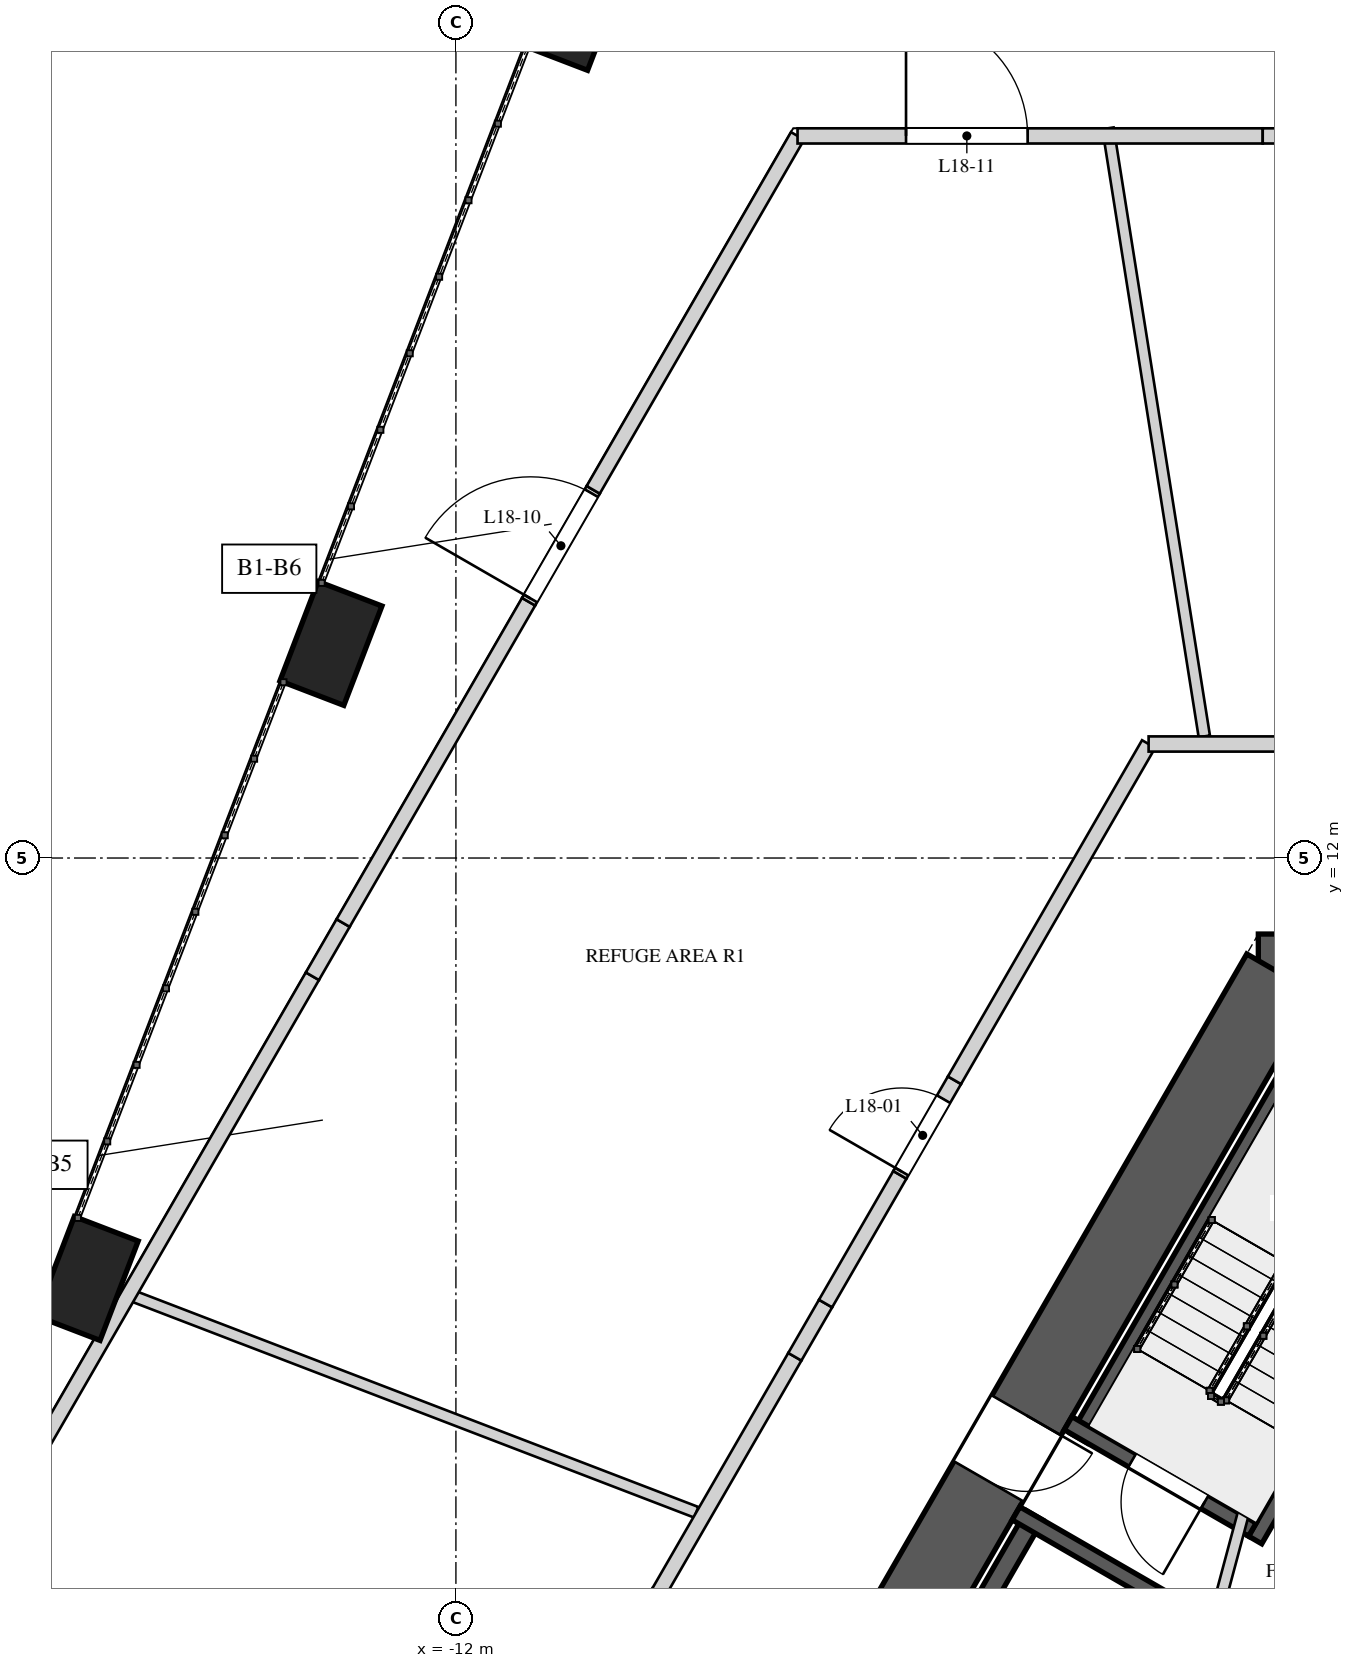
"""IFC4 building model, lengths in metres.
Left out: names, types, materials, properties, quantities, classifications, styles, units other than length and angle.
Written with IfcOpenShell. Run it as: python <this file> out.ifc"""

import sys

from ifc_helpers import new_model, si_unit, direction, frame, frame_2d, origin, origin_2d, place, context, subcontext, project, spatial, polyline, rectangle, outline, extrude, element, fill, save


model = new_model("IFC4")
c1 = context("Model", 3, precision=1e-05, world=origin(), true_north=direction((0.0, 1.0)))
c2 = subcontext(c1, "Body", "Model", "MODEL_VIEW")
j1 = project(units=[si_unit("LENGTHUNIT", "METRE"), si_unit("PLANEANGLEUNIT", "RADIAN")], contexts=[c1])
p1 = place(None, origin())
s1 = spatial("IfcSite", under=j1, at=p1, CompositionType="ELEMENT")
p2 = place(p1, origin())
s2 = spatial("IfcBuilding", under=s1, at=p2, CompositionType="ELEMENT")
p3 = place(p2, frame((0.0, 0.0, 83.2)))
s3 = spatial("IfcBuildingStorey", under=s2, at=p3, CompositionType="ELEMENT", Elevation=83.2)
p4 = place(p3, frame((1.443, 10.475, 0.0), z_axis=(0.0, 0.0, 1.0), x_axis=(-1.0, 0.0, 0.0)))
e1 = element("IfcWall", 1, at=p4, inside=s3, PredefinedType="SHEAR", context=c2, shape_type="SweptSolid", body=[
    extrude(rectangle(XDim=2.887, YDim=1.05, at=frame_2d((1.443, 0.0))), origin(), (0.0, 0.0, 1.0), 5.2),
])
p5 = place(p3, frame((-1.14, 10.475, 0.0), z_axis=(0.0, 0.0, 1.0), x_axis=(-0.499985955615, -0.866033512162, 0.0)))
e2 = element("IfcWall", 2, at=p5, inside=s3, PredefinedType="SHEAR", context=c2, shape_type="SweptSolid", body=[
    extrude(rectangle(XDim=17.003, YDim=1.05, at=frame_2d((8.501, 0.0))), origin(), (0.0, 0.0, 1.0), 5.2),
])
p6 = place(p5, frame((6.707, 0.0, 0.0)))
e3 = element("IfcOpeningElement", 3, at=p6, cuts=e2, PredefinedType="OPENING", context=c2, shape_type="SweptSolid", body=[
    extrude(rectangle(XDim=1.0, YDim=2.4, at=frame_2d((0.5, 1.2))), frame((0.0, 0.535, 0.0), z_axis=(0.0, -1.0, 0.0), x_axis=(1.0, 0.0, 0.0)), (0.0, 0.0, 1.0), 1.07),
])
for number, where, z_axis, x_axis in (
    (4, (-10.437, 23.178, 0.0), (0.0, 0.0, 1.0), (-0.358, -0.934, 0.0)),
    (5, (-13.644, 14.823, 0.0), (0.0, 0.0, 1.0), (-0.358, -0.934, 0.0)),
    (6, (-16.851, 6.469, 0.0), (0.0, 0.0, 1.0), (-0.358, -0.934, 0.0)),
):
    element("IfcColumn", number, at=place(p3, frame(where, z_axis=z_axis, x_axis=x_axis)), inside=s3, PredefinedType="COLUMN", context=c2, shape_type="SweptSolid", body=[
        extrude(rectangle(XDim=1.4, YDim=0.9, at=origin_2d()), origin(), (0.0, 0.0, 1.0), 2.864),
    ])
p7 = place(p3, frame((-0.701, 9.735, 0.0), z_axis=(0.0, 0.0, 1.0), x_axis=(-0.500026960575, -0.86600983753, 0.0)))
e7 = element("IfcWall", 7, at=p7, inside=s3, PredefinedType="SOLIDWALL", context=c2, shape_type="SweptSolid", body=[
    extrude(rectangle(XDim=6.2, YDim=0.25, at=frame_2d((3.1, 0.0))), origin(), (0.0, 0.0, 1.0), 4.85),
])
p8 = place(p3, frame((1.674, 8.5, 0.0), z_axis=(0.0, 0.0, 1.0), x_axis=(-0.499995607161, -0.866027939976, 0.0)))
e8 = element("IfcWall", 8, at=p8, inside=s3, PredefinedType="SOLIDWALL", context=c2, shape_type="SweptSolid", body=[
    extrude(rectangle(XDim=6.318, YDim=0.2, at=frame_2d((3.159, 0.0))), origin(), (0.0, 0.0, 1.0), 4.85),
])
p9 = place(p3, frame((-1.521, 3.165, 0.0), z_axis=(0.0, 0.0, 1.0), x_axis=(-0.866034573852, 0.49998411664, 0.0)))
e9 = element("IfcWall", 9, at=p9, inside=s3, PredefinedType="SOLIDWALL", context=c2, shape_type="SweptSolid", body=[
    extrude(rectangle(XDim=2.8, YDim=0.2, at=frame_2d((1.4, 0.0))), origin(), (0.0, 0.0, 1.0), 4.85),
])
p10 = place(p9, frame((0.725, 0.0, 0.0)))
e10 = element("IfcOpeningElement", 10, at=p10, cuts=e9, PredefinedType="OPENING", context=c2, shape_type="SweptSolid", body=[
    extrude(rectangle(XDim=1.1, YDim=2.4, at=frame_2d((0.55, 1.2))), frame((0.0, 0.11, 0.0), z_axis=(0.0, -1.0, 0.0), x_axis=(1.0, 0.0, 0.0)), (0.0, 0.0, 1.0), 0.22),
])
p11 = place(p3, frame((-4.386, 3.352, 0.0), z_axis=(0.0, 0.0, 1.0), x_axis=(-0.500015767406, -0.866016300277, 0.0)))
e11 = element("IfcWall", 11, at=p11, inside=s3, PredefinedType="SOLIDWALL", context=c2, shape_type="SweptSolid", body=[
    extrude(rectangle(XDim=5.5, YDim=0.25, at=frame_2d((2.75, 0.0))), origin(), (0.0, 0.0, 1.0), 4.85),
])
p12 = place(p3, frame((-2.38, 2.078, 0.0), z_axis=(0.0, 0.0, 1.0), x_axis=(-0.866062058628, 0.499936506574, 0.0)))
e12 = element("IfcWall", 12, at=p12, inside=s3, PredefinedType="SOLIDWALL", context=c2, shape_type="SweptSolid", body=[
    extrude(rectangle(XDim=2.6, YDim=0.2, at=frame_2d((1.3, 0.0))), origin(), (0.0, 0.0, 1.0), 4.85),
])
p13 = place(p3, frame((-2.178, 1.372, 0.0), z_axis=(0.0, 0.0, 1.0), x_axis=(0.258808958833, 0.96592852884, 0.0)))
e13 = element("IfcWall", 13, at=p13, inside=s3, PredefinedType="PARTITIONING", context=c2, shape_type="SweptSolid", body=[
    extrude(rectangle(XDim=2.903, YDim=0.15, at=frame_2d((1.451, 0.0))), origin(), (0.0, 0.0, 1.0), 4.85),
])
p14 = place(p3, frame((-1.51, 4.215, 0.0), z_axis=(0.0, 0.0, 1.0), x_axis=(0.866085525409, 0.49989585183, 0.0)))
e14 = element("IfcWall", 14, at=p14, inside=s3, PredefinedType="PARTITIONING", context=c2, shape_type="SweptSolid", body=[
    extrude(rectangle(XDim=1.3, YDim=0.15, at=frame_2d((0.65, 0.0))), origin(), (0.0, 0.0, 1.0), 4.85),
])
p15 = place(p3, frame((-8.838, 3.393, 0.0), z_axis=(0.0, 0.0, 1.0), x_axis=(-0.933579605878, 0.358370087324, 0.0)))
e15 = element("IfcWall", 15, at=p15, inside=s3, PredefinedType="PARTITIONING", context=c2, shape_type="SweptSolid", body=[
    extrude(rectangle(XDim=8.033, YDim=0.15, at=frame_2d((4.017, 0.0))), origin(), (0.0, 0.0, 1.0), 4.85),
])
p16 = place(p3, frame((-3.421, 21.6, 0.0), z_axis=(0.0, 0.0, 1.0), x_axis=(0.156440847234, -0.987687329734, 0.0)))
e16 = element("IfcWall", 16, at=p16, inside=s3, PredefinedType="PARTITIONING", context=c2, shape_type="SweptSolid", body=[
    extrude(rectangle(XDim=8.099, YDim=0.15, at=frame_2d((4.05, 0.0))), origin(), (0.0, 0.0, 1.0), 4.85),
])
p17 = place(p3, frame((-9.33, 2.341, 0.0), z_axis=(0.0, 0.0, 1.0), x_axis=(0.500029679218, 0.866008267802, 0.0)))
e17 = element("IfcWall", 17, at=p17, inside=s3, PredefinedType="SOLIDWALL", context=c2, shape_type="SweptSolid", body=[
    extrude(rectangle(XDim=3.577, YDim=0.2, at=frame_2d((1.789, 0.0))), origin(), (0.0, 0.0, 1.0), 4.85),
])
p18 = place(p3, frame((-7.541, 5.438, 0.0), z_axis=(0.0, 0.0, 1.0), x_axis=(0.499809598504, 0.866135304236, 0.0)))
e18 = element("IfcWall", 18, at=p18, inside=s3, PredefinedType="SOLIDWALL", context=c2, shape_type="SweptSolid", body=[
    extrude(rectangle(XDim=0.808, YDim=0.2, at=frame_2d((0.404, 0.0))), origin(), (0.0, 0.0, 1.0), 3.95),
])
p19 = place(p3, frame((-7.137, 6.139, 0.0), z_axis=(0.0, 0.0, 1.0), x_axis=(0.500061185694, 0.865990075325, 0.0)))
e19 = element("IfcWall", 19, at=p19, inside=s3, PredefinedType="SOLIDWALL", context=c2, shape_type="SweptSolid", body=[
    extrude(rectangle(XDim=1.955, YDim=0.2, at=frame_2d((0.978, 0.0))), origin(), (0.0, 0.0, 1.0), 4.85),
])
p20 = place(p3, frame((-6.159, 7.832, 0.0), z_axis=(0.0, 0.0, 1.0), x_axis=(0.500011588718, 0.866018712932, 0.0)))
e20 = element("IfcWall", 20, at=p20, inside=s3, PredefinedType="SOLIDWALL", context=c2, shape_type="SweptSolid", body=[
    extrude(outline(polyline([(0.0, 0.0), (1.438, 0.0), (1.437, 3.75), (0.431, 3.75), (0.431, 4.85), (0.0, 4.85), (0.0, 0.0)])), frame((0.0, 0.1, 0.0), z_axis=(0.0, -1.0, 0.0), x_axis=(1.0, 0.0, 0.0)), (0.0, 0.0, 1.0), 0.2),
])
p21 = place(p20, frame((0.05, 0.0, 0.0)))
e21 = element("IfcOpeningElement", 21, at=p21, cuts=e20, PredefinedType="OPENING", context=c2, shape_type="SweptSolid", body=[
    extrude(rectangle(XDim=1.1, YDim=2.2, at=frame_2d((0.55, 1.1))), frame((0.0, 0.11, 0.0), z_axis=(0.0, -1.0, 0.0), x_axis=(1.0, 0.0, 0.0)), (0.0, 0.0, 1.0), 0.22),
])
p22 = place(p3, frame((-5.441, 9.076, 0.0), z_axis=(0.0, 0.0, 1.0), x_axis=(0.499999658466, 0.866025600969, 0.0)))
e22 = element("IfcWall", 22, at=p22, inside=s3, PredefinedType="SOLIDWALL", context=c2, shape_type="SweptSolid", body=[
    extrude(rectangle(XDim=5.108, YDim=0.2, at=frame_2d((2.554, 0.0))), origin(), (0.0, 0.0, 1.0), 4.85),
])
p23 = place(p3, frame((-2.887, 13.5, 0.0), z_axis=(0.0, 0.0, 1.0), x_axis=(1.0, 0.0, 0.0)))
e23 = element("IfcWall", 23, at=p23, inside=s3, PredefinedType="SOLIDWALL", context=c2, shape_type="SweptSolid", body=[
    extrude(rectangle(XDim=1.868, YDim=0.2, at=frame_2d((0.934, 0.0))), origin(), (0.0, 0.0, 1.0), 4.85),
])
p24 = place(p3, frame((-18.015, 3.297, 0.0), z_axis=(0.0, 0.0, 1.0), x_axis=(0.500010949126, 0.866019082211, 0.0)))
e24 = element("IfcWall", 24, at=p24, inside=s3, PredefinedType="SOLIDWALL", context=c2, shape_type="SweptSolid", body=[
    extrude(rectangle(XDim=8.253, YDim=0.2, at=frame_2d((4.126, 0.0))), origin(), (0.0, 0.0, 1.0), 4.85),
])
p25 = place(p3, frame((-13.888, 10.445, 0.0), z_axis=(0.0, 0.0, 1.0), x_axis=(0.499809598504, 0.866135304236, 0.0)))
e25 = element("IfcWall", 25, at=p25, inside=s3, PredefinedType="SOLIDWALL", context=c2, shape_type="SweptSolid", body=[
    extrude(rectangle(XDim=0.808, YDim=0.2, at=frame_2d((0.404, 0.0))), origin(), (0.0, 0.0, 1.0), 3.95),
])
p26 = place(p3, frame((-13.484, 11.145, 0.0), z_axis=(0.0, 0.0, 1.0), x_axis=(0.500012559894, 0.866018152205, 0.0)))
e26 = element("IfcWall", 26, at=p26, inside=s3, PredefinedType="SOLIDWALL", context=c2, shape_type="SweptSolid", body=[
    extrude(rectangle(XDim=4.881, YDim=0.2, at=frame_2d((2.44, 0.0))), origin(), (0.0, 0.0, 1.0), 4.85),
])
p27 = place(p3, frame((-11.044, 15.372, 0.0), z_axis=(0.0, 0.0, 1.0), x_axis=(0.500062241894, 0.865989465428, 0.0)))
e27 = element("IfcWall", 27, at=p27, inside=s3, PredefinedType="SOLIDWALL", context=c2, shape_type="SweptSolid", body=[
    extrude(outline(polyline([(0.0, 0.0), (1.7, 0.0), (1.7, 4.85), (1.36, 4.85), (1.36, 3.75), (0.353, 3.75), (0.353, 4.85), (0.0, 4.85), (0.0, 0.0)])), frame((0.0, 0.1, 0.0), z_axis=(0.0, -1.0, 0.0), x_axis=(1.0, 0.0, 0.0)), (0.0, 0.0, 1.0), 0.2),
])
p28 = place(p27, frame((0.05, 0.0, 0.0)))
e28 = element("IfcOpeningElement", 28, at=p28, cuts=e27, PredefinedType="OPENING", context=c2, shape_type="SweptSolid", body=[
    extrude(rectangle(XDim=1.6, YDim=2.3, at=frame_2d((0.8, 1.15))), frame((0.0, 0.11, 0.0), z_axis=(0.0, -1.0, 0.0), x_axis=(1.0, 0.0, 0.0)), (0.0, 0.0, 1.0), 0.22),
])
p29 = place(p3, frame((-10.194, 16.844, 0.0), z_axis=(0.0, 0.0, 1.0), x_axis=(0.499977964579, 0.866038125567, 0.0)))
e29 = element("IfcWall", 29, at=p29, inside=s3, PredefinedType="SOLIDWALL", context=c2, shape_type="SweptSolid", body=[
    extrude(rectangle(XDim=5.376, YDim=0.2, at=frame_2d((2.688, 0.0))), origin(), (0.0, 0.0, 1.0), 4.85),
])
p30 = place(p3, frame((-7.506, 21.5, 0.0), z_axis=(0.0, 0.0, 1.0), x_axis=(1.0, 0.0, 0.0)))
e30 = element("IfcWall", 30, at=p30, inside=s3, PredefinedType="SOLIDWALL", context=c2, shape_type="SweptSolid", body=[
    extrude(rectangle(XDim=6.12, YDim=0.2, at=frame_2d((3.06, 0.0))), origin(), (0.0, 0.0, 1.0), 4.85),
])
p31 = place(p30, frame((1.427, 0.0, 0.0)))
e31 = element("IfcOpeningElement", 31, at=p31, cuts=e30, PredefinedType="OPENING", context=c2, shape_type="SweptSolid", body=[
    extrude(rectangle(XDim=1.6, YDim=2.3, at=frame_2d((0.8, 1.15))), frame((0.0, 0.11, 0.0), z_axis=(0.0, -1.0, 0.0), x_axis=(1.0, 0.0, 0.0)), (0.0, 0.0, 1.0), 0.22),
])
p32 = place(p3, frame((-1.385, 21.5, 0.0), z_axis=(0.0, 0.0, 1.0), x_axis=(1.0, 0.0, 0.0)))
e32 = element("IfcWall", 32, at=p32, inside=s3, PredefinedType="SOLIDWALL", context=c2, shape_type="SweptSolid", body=[
    extrude(rectangle(XDim=0.801, YDim=0.2, at=frame_2d((0.4, 0.0))), origin(), (0.0, 0.0, 1.0), 3.95),
])
p33 = place(p10, origin())
e33 = element("IfcDoor", 33, at=p33, inside=s3, OperationType="SINGLE_SWING_RIGHT", PredefinedType="DOOR", context=c2, shape_type="SweptSolid", body=[
    extrude(rectangle(XDim=1.1, YDim=2.4, at=frame_2d((0.55, 1.2))), frame((0.0, 0.025, 0.0), z_axis=(0.0, -1.0, 0.0), x_axis=(1.0, 0.0, 0.0)), (0.0, 0.0, 1.0), 0.05),
])
fill(e10, e33)
p34 = place(p6, origin())
e34 = element("IfcDoor", 34, at=p34, inside=s3, OperationType="SINGLE_SWING_RIGHT", PredefinedType="DOOR", context=c2, shape_type="SweptSolid", body=[
    extrude(rectangle(XDim=1.0, YDim=2.4, at=frame_2d((0.5, 1.2))), frame((0.0, 0.025, 0.0), z_axis=(0.0, -1.0, 0.0), x_axis=(1.0, 0.0, 0.0)), (0.0, 0.0, 1.0), 0.05),
])
fill(e3, e34)
p35 = place(p21, origin())
e35 = element("IfcDoor", 35, at=p35, inside=s3, OperationType="SINGLE_SWING_LEFT", PredefinedType="DOOR", context=c2, shape_type="SweptSolid", body=[
    extrude(rectangle(XDim=1.1, YDim=2.2, at=frame_2d((0.55, 1.1))), frame((0.0, 0.025, 0.0), z_axis=(0.0, -1.0, 0.0), x_axis=(1.0, 0.0, 0.0)), (0.0, 0.0, 1.0), 0.05),
])
fill(e21, e35)
p36 = place(p28, origin())
e36 = element("IfcDoor", 36, at=p36, inside=s3, OperationType="DOUBLE_DOOR_SINGLE_SWING", PredefinedType="DOOR", context=c2, shape_type="SweptSolid", body=[
    extrude(rectangle(XDim=1.6, YDim=2.3, at=frame_2d((0.8, 1.15))), frame((0.0, 0.025, 0.0), z_axis=(0.0, -1.0, 0.0), x_axis=(1.0, 0.0, 0.0)), (0.0, 0.0, 1.0), 0.05),
])
fill(e28, e36)
p37 = place(p31, origin())
e37 = element("IfcDoor", 37, at=p37, inside=s3, OperationType="DOUBLE_DOOR_SINGLE_SWING", PredefinedType="DOOR", context=c2, shape_type="SweptSolid", body=[
    extrude(rectangle(XDim=1.6, YDim=2.3, at=frame_2d((0.8, 1.15))), frame((0.0, 0.025, 0.0), z_axis=(0.0, -1.0, 0.0), x_axis=(1.0, 0.0, 0.0)), (0.0, 0.0, 1.0), 0.05),
])
fill(e31, e37)
save(model, sys.argv[1])
